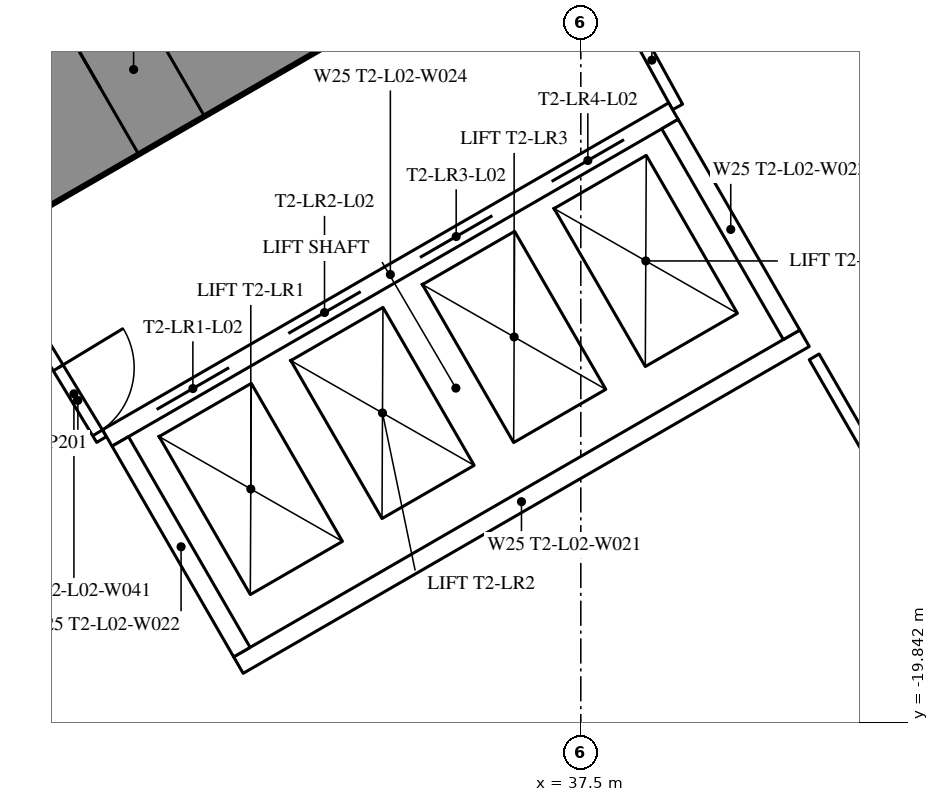
"""IFC4 building model, lengths in metres.
Left out: names, types, materials, properties, quantities, classifications, styles, units other than length and angle.
Written with IfcOpenShell. Run it as: python <this file> out.ifc"""

import sys

from ifc_helpers import new_model, si_unit, direction, frame, frame_2d, origin, place, context, subcontext, project, spatial, rectangle, extrude, element, fill, save


model = new_model("IFC4")
c1 = context("Model", 3, precision=1e-05, world=origin(), true_north=direction((0.0, 1.0)))
c2 = subcontext(c1, "Body", "Model", "MODEL_VIEW")
j1 = project(units=[si_unit("LENGTHUNIT", "METRE"), si_unit("PLANEANGLEUNIT", "RADIAN")], contexts=[c1])
p1 = place(None, origin())
s1 = spatial("IfcSite", under=j1, at=p1, CompositionType="ELEMENT")
p2 = place(p1, origin())
s2 = spatial("IfcBuilding", under=s1, at=p2, CompositionType="ELEMENT")
p3 = place(p2, frame((0.0, 0.0, 12.6)))
s3 = spatial("IfcBuildingStorey", under=s2, at=p3, CompositionType="ELEMENT", Elevation=12.6)
p4 = place(p3, frame((27.2, -13.8, 0.0), z_axis=(0.0, 0.0, 1.0), x_axis=(0.866027159892, 0.499996958321, 0.0)))
e1 = element("IfcWall", 1, at=p4, inside=s3, PredefinedType="SHEAR", context=c2, shape_type="SweptSolid", body=[
    extrude(rectangle(XDim=27.947, YDim=2.0, at=frame_2d((13.973, 0.0))), origin(), (0.0, 0.0, 1.0), 5.4),
])
p5 = place(p4, frame((4.6, 0.0, 0.0)))
e2 = element("IfcOpeningElement", 2, at=p5, cuts=e1, PredefinedType="OPENING", context=c2, shape_type="SweptSolid", body=[
    extrude(rectangle(XDim=1.0, YDim=2.2, at=frame_2d((0.5, 1.1))), frame((0.0, 1.01, 0.0), z_axis=(0.0, -1.0, 0.0), x_axis=(1.0, 0.0, 0.0)), (0.0, 0.0, 1.0), 2.02),
])
p6 = place(p4, frame((13.395, 0.0, 0.0)))
e3 = element("IfcOpeningElement", 3, at=p6, cuts=e1, PredefinedType="OPENING", context=c2, shape_type="SweptSolid", body=[
    extrude(rectangle(XDim=1.8, YDim=2.2, at=frame_2d((0.9, 1.1))), frame((0.0, 1.01, 0.0), z_axis=(0.0, -1.0, 0.0), x_axis=(1.0, 0.0, 0.0)), (0.0, 0.0, 1.0), 2.02),
])
p7 = place(p3, frame((40.57, -15.03, 0.0), z_axis=(0.0, 0.0, 1.0), x_axis=(0.500012993597, -0.866017901798, 0.0)))
e4 = element("IfcWall", 4, at=p7, inside=s3, PredefinedType="PARTITIONING", context=c2, shape_type="SweptSolid", body=[
    extrude(rectangle(XDim=4.243, YDim=0.15, at=frame_2d((2.122, 0.0))), origin(), (0.0, 0.0, 1.0), 5.15),
])
p8 = place(p3, frame((27.5, -16.744, 0.0), z_axis=(0.0, 0.0, 1.0), x_axis=(0.866034395887, 0.499984424899, 0.0)))
e5 = element("IfcWall", 5, at=p8, inside=s3, PredefinedType="PARTITIONING", context=c2, shape_type="SweptSolid", body=[
    extrude(rectangle(XDim=3.469, YDim=0.2, at=frame_2d((1.734, 0.0))), origin(), (0.0, 0.0, 1.0), 4.25),
])
p9 = place(p3, frame((30.467, -14.916, 0.0), z_axis=(0.0, 0.0, 1.0), x_axis=(0.518297865337, -0.855200165334, 0.0)))
e6 = element("IfcWall", 6, at=p9, inside=s3, PredefinedType="PARTITIONING", context=c2, shape_type="SweptSolid", body=[
    extrude(rectangle(XDim=1.405, YDim=0.15, at=frame_2d((0.703, 0.0))), origin(), (0.0, 0.0, 1.0), 5.15),
])
p10 = place(p9, frame((0.303, 0.0, 0.0)))
e7 = element("IfcOpeningElement", 7, at=p10, cuts=e6, PredefinedType="OPENING", context=c2, shape_type="SweptSolid", body=[
    extrude(rectangle(XDim=1.0, YDim=2.2, at=frame_2d((0.5, 1.1))), frame((0.0, 0.085, 0.0), z_axis=(0.0, -1.0, 0.0), x_axis=(1.0, 0.0, 0.0)), (0.0, 0.0, 1.0), 0.17),
])
p11 = place(p3, frame((38.773, -11.742, 0.0), z_axis=(0.0, 0.0, 1.0), x_axis=(-0.481418475768, 0.876490873421, 0.0)))
e8 = element("IfcWall", 8, at=p11, inside=s3, PredefinedType="PARTITIONING", context=c2, shape_type="SweptSolid", body=[
    extrude(rectangle(XDim=1.405, YDim=0.15, at=frame_2d((0.703, 0.0))), origin(), (0.0, 0.0, 1.0), 5.15),
])
p12 = place(p3, frame((31.271, -16.097, 0.0), z_axis=(0.0, 0.0, 1.0), x_axis=(0.86604045752, 0.499973925258, 0.0)))
e9 = element("IfcWall", 9, at=p12, inside=s3, PredefinedType="PARTITIONING", context=c2, shape_type="SweptSolid", body=[
    extrude(rectangle(XDim=8.6, YDim=0.25, at=frame_2d((4.3, 0.0))), origin(), (0.0, 0.0, 1.0), 5.15),
])
p13 = place(p12, frame((0.75, 0.0, 0.0)))
e10 = element("IfcOpeningElement", 10, at=p13, cuts=e9, PredefinedType="OPENING", context=c2, shape_type="SweptSolid", body=[
    extrude(rectangle(XDim=1.1, YDim=2.2, at=frame_2d((0.55, 1.1))), frame((0.0, 0.135, 0.0), z_axis=(0.0, -1.0, 0.0), x_axis=(1.0, 0.0, 0.0)), (0.0, 0.0, 1.0), 0.27),
])
p14 = place(p12, frame((2.75, 0.0, 0.0)))
e11 = element("IfcOpeningElement", 11, at=p14, cuts=e9, PredefinedType="OPENING", context=c2, shape_type="SweptSolid", body=[
    extrude(rectangle(XDim=1.1, YDim=2.2, at=frame_2d((0.55, 1.1))), frame((0.0, 0.135, 0.0), z_axis=(0.0, -1.0, 0.0), x_axis=(1.0, 0.0, 0.0)), (0.0, 0.0, 1.0), 0.27),
])
p15 = place(p12, frame((4.75, 0.0, 0.0)))
e12 = element("IfcOpeningElement", 12, at=p15, cuts=e9, PredefinedType="OPENING", context=c2, shape_type="SweptSolid", body=[
    extrude(rectangle(XDim=1.1, YDim=2.2, at=frame_2d((0.55, 1.1))), frame((0.0, 0.135, 0.0), z_axis=(0.0, -1.0, 0.0), x_axis=(1.0, 0.0, 0.0)), (0.0, 0.0, 1.0), 0.27),
])
p16 = place(p12, frame((6.75, 0.0, 0.0)))
e13 = element("IfcOpeningElement", 13, at=p16, cuts=e9, PredefinedType="OPENING", context=c2, shape_type="SweptSolid", body=[
    extrude(rectangle(XDim=1.1, YDim=2.2, at=frame_2d((0.55, 1.1))), frame((0.0, 0.135, 0.0), z_axis=(0.0, -1.0, 0.0), x_axis=(1.0, 0.0, 0.0)), (0.0, 0.0, 1.0), 0.27),
])
p17 = place(p3, frame((32.996, -19.086, 0.0), z_axis=(0.0, 0.0, 1.0), x_axis=(0.866028165386, 0.499995216735, 0.0)))
e14 = element("IfcWall", 14, at=p17, inside=s3, PredefinedType="PARTITIONING", context=c2, shape_type="SweptSolid", body=[
    extrude(rectangle(XDim=8.6, YDim=0.25, at=frame_2d((4.3, 0.0))), origin(), (0.0, 0.0, 1.0), 5.15),
])
for number, where, z_axis, x_axis in (
    (15, (31.441, -16.143, 0.0), (0.0, 0.0, 1.0), (0.5, -0.866, 0.0)),
    (16, (38.673, -11.968, 0.0), (0.0, 0.0, 1.0), (0.5, -0.866, 0.0)),
):
    element("IfcWall", number, at=place(p3, frame(where, z_axis=z_axis, x_axis=x_axis)), inside=s3, PredefinedType="PARTITIONING", context=c2, shape_type="SweptSolid", body=[
        extrude(rectangle(XDim=3.201, YDim=0.25, at=frame_2d((1.6, 0.0))), origin(), (0.0, 0.0, 1.0), 5.15),
    ])
p18 = place(p10, origin())
e17 = element("IfcDoor", 17, at=p18, inside=s3, OperationType="SINGLE_SWING_LEFT", PredefinedType="DOOR", context=c2, shape_type="SweptSolid", body=[
    extrude(rectangle(XDim=1.0, YDim=2.2, at=frame_2d((0.5, 1.1))), frame((0.0, 0.025, 0.0), z_axis=(0.0, -1.0, 0.0), x_axis=(1.0, 0.0, 0.0)), (0.0, 0.0, 1.0), 0.05),
])
fill(e7, e17)
p19 = place(p5, origin())
e18 = element("IfcDoor", 18, at=p19, inside=s3, OperationType="SINGLE_SWING_LEFT", PredefinedType="DOOR", context=c2, shape_type="SweptSolid", body=[
    extrude(rectangle(XDim=1.0, YDim=2.2, at=frame_2d((0.5, 1.1))), frame((0.0, 0.025, 0.0), z_axis=(0.0, -1.0, 0.0), x_axis=(1.0, 0.0, 0.0)), (0.0, 0.0, 1.0), 0.05),
])
fill(e2, e18)
p20 = place(p13, origin())
e19 = element("IfcDoor", 19, at=p20, inside=s3, OperationType="DOUBLE_DOOR_SLIDING", PredefinedType="USERDEFINED", context=c2, shape_type="SweptSolid", body=[
    extrude(rectangle(XDim=1.1, YDim=2.2, at=frame_2d((0.55, 1.1))), frame((0.0, 0.025, 0.0), z_axis=(0.0, -1.0, 0.0), x_axis=(1.0, 0.0, 0.0)), (0.0, 0.0, 1.0), 0.05),
])
fill(e10, e19)
p21 = place(p14, origin())
e20 = element("IfcDoor", 20, at=p21, inside=s3, OperationType="DOUBLE_DOOR_SLIDING", PredefinedType="USERDEFINED", context=c2, shape_type="SweptSolid", body=[
    extrude(rectangle(XDim=1.1, YDim=2.2, at=frame_2d((0.55, 1.1))), frame((0.0, 0.025, 0.0), z_axis=(0.0, -1.0, 0.0), x_axis=(1.0, 0.0, 0.0)), (0.0, 0.0, 1.0), 0.05),
])
fill(e11, e20)
p22 = place(p15, origin())
e21 = element("IfcDoor", 21, at=p22, inside=s3, OperationType="DOUBLE_DOOR_SLIDING", PredefinedType="USERDEFINED", context=c2, shape_type="SweptSolid", body=[
    extrude(rectangle(XDim=1.1, YDim=2.2, at=frame_2d((0.55, 1.1))), frame((0.0, 0.025, 0.0), z_axis=(0.0, -1.0, 0.0), x_axis=(1.0, 0.0, 0.0)), (0.0, 0.0, 1.0), 0.05),
])
fill(e12, e21)
p23 = place(p16, origin())
e22 = element("IfcDoor", 22, at=p23, inside=s3, OperationType="DOUBLE_DOOR_SLIDING", PredefinedType="USERDEFINED", context=c2, shape_type="SweptSolid", body=[
    extrude(rectangle(XDim=1.1, YDim=2.2, at=frame_2d((0.55, 1.1))), frame((0.0, 0.025, 0.0), z_axis=(0.0, -1.0, 0.0), x_axis=(1.0, 0.0, 0.0)), (0.0, 0.0, 1.0), 0.05),
])
fill(e13, e22)
save(model, sys.argv[1])
